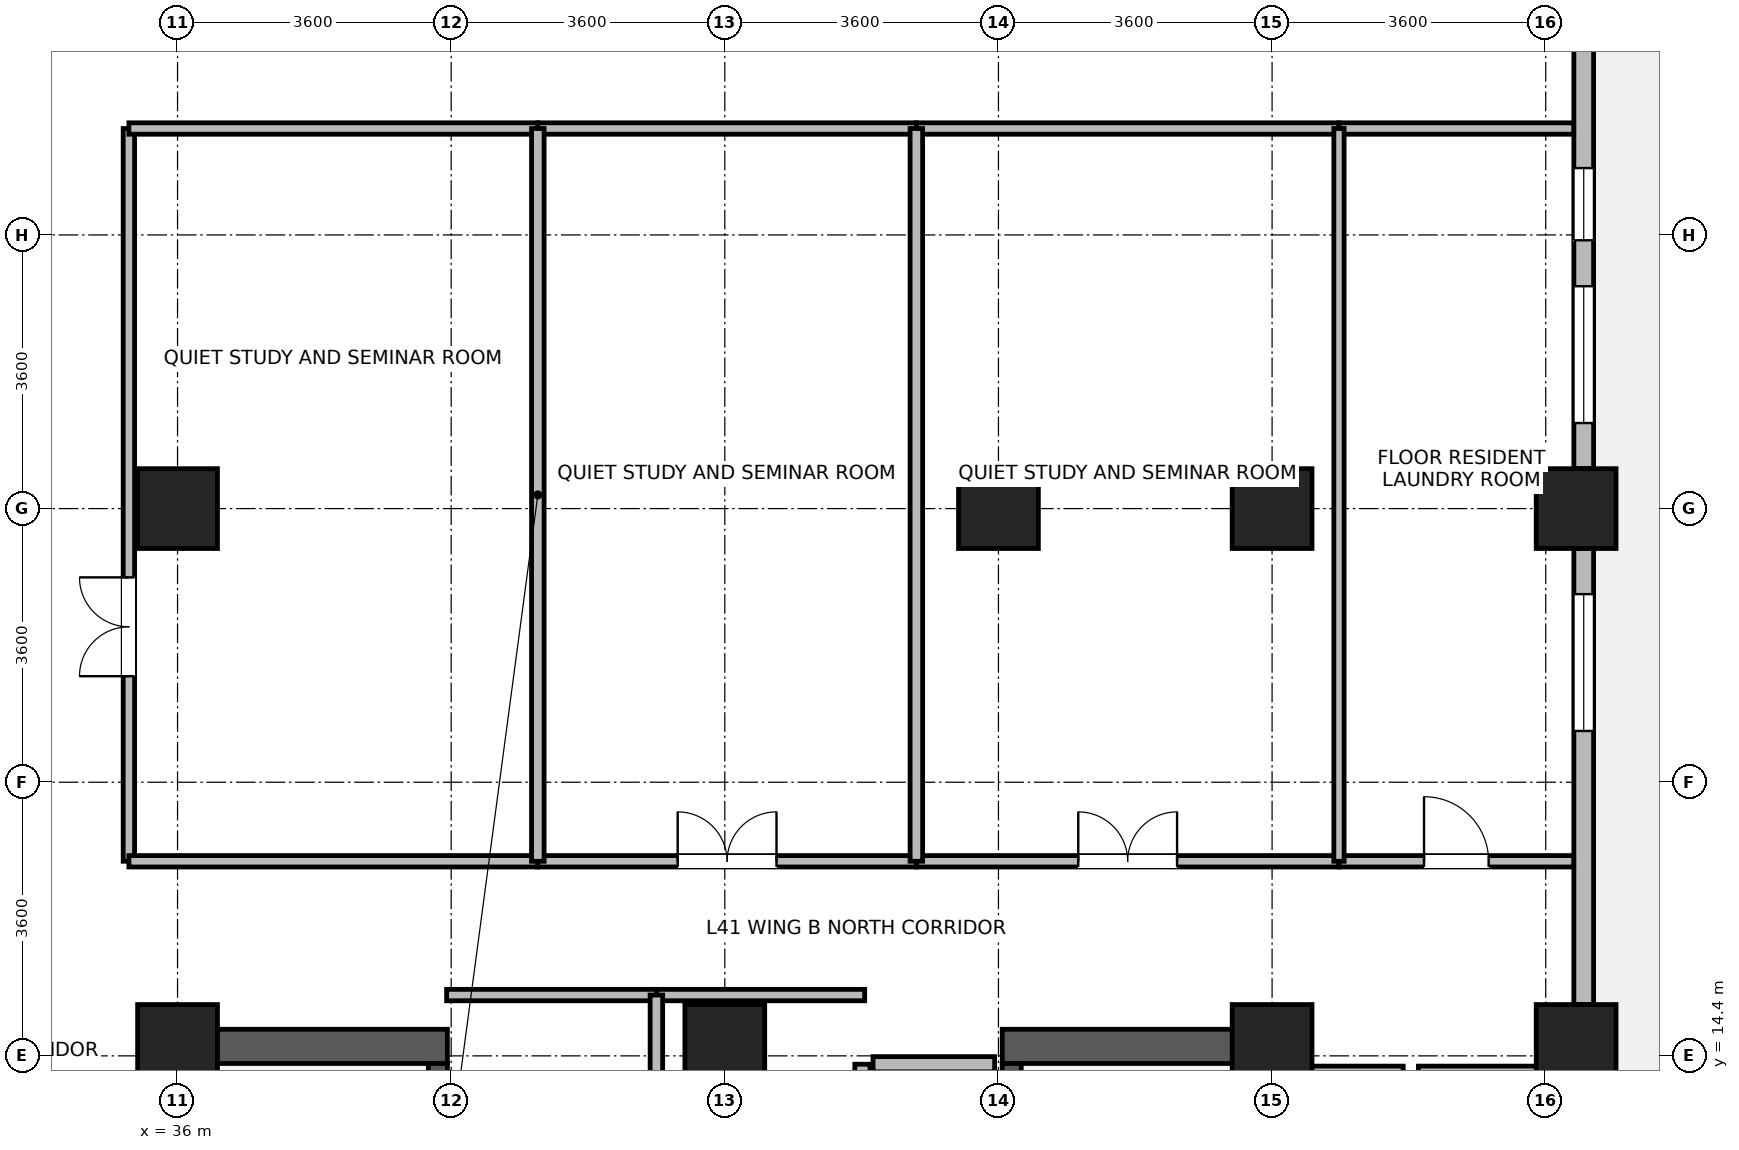
"""IFC4 building model, lengths in metres.
Left out: names, types, materials, properties, quantities, classifications, styles, units other than length and angle.
Written with IfcOpenShell. Run it as: python <this file> out.ifc"""

import sys

from ifc_helpers import new_model, si_unit, direction, frame, frame_2d, origin, origin_2d, place, context, subcontext, project, spatial, rectangle, extrude, source, transform, mapped, element, fill, save


model = new_model("IFC4")
c1 = context("Model", 3, precision=1e-05, world=origin(), true_north=direction((0.0, 1.0)))
c2 = subcontext(c1, "Body", "Model", "MODEL_VIEW")
j1 = project(units=[si_unit("LENGTHUNIT", "METRE"), si_unit("PLANEANGLEUNIT", "RADIAN")], contexts=[c1])
p1 = place(None, origin())
s1 = spatial("IfcSite", under=j1, at=p1, CompositionType="ELEMENT")
p2 = place(p1, origin())
s2 = spatial("IfcBuilding", under=s1, at=p2, CompositionType="ELEMENT")
p3 = place(p2, frame((0.0, 0.0, 162.4)))
s3 = spatial("IfcBuildingStorey", under=s2, at=p3, CompositionType="ELEMENT", Elevation=162.4)
for number, where, z_axis, x_axis in (
    (1, (36.125, 6.85, 0.0), (0.0, 0.0, 1.0), (0.0, 1.0, 0.0)),
    (2, (50.275, 6.85, 0.0), (0.0, 0.0, 1.0), (0.0, 1.0, 0.0)),
):
    element("IfcWall", number, at=place(p3, frame(where, z_axis=z_axis, x_axis=x_axis)), inside=s3, PredefinedType="SHEAR", context=c2, shape_type="SweptSolid", body=[
        extrude(rectangle(XDim=7.9, YDim=0.45, at=frame_2d((3.95, 0.0))), origin(), (0.0, 0.0, 1.0), 3.46),
    ])
for number, where, z_axis, x_axis in (
    (3, (36.35, 14.525, 0.0), (0.0, 0.0, 1.0), (1.0, 0.0, 0.0)),
    (4, (46.85, 14.525, 0.0), (0.0, 0.0, 1.0), (1.0, 0.0, 0.0)),
):
    element("IfcWall", number, at=place(p3, frame(where, z_axis=z_axis, x_axis=x_axis)), inside=s3, PredefinedType="SHEAR", context=c2, shape_type="SweptSolid", body=[
        extrude(rectangle(XDim=3.2, YDim=0.45, at=frame_2d((1.6, 0.0))), origin(), (0.0, 0.0, 1.0), 3.46),
    ])
p4 = place(p3, frame((39.425, 7.3, 0.0), z_axis=(0.0, 0.0, 1.0), x_axis=(0.0, 1.0, 0.0)))
e5 = element("IfcWall", 5, at=p4, inside=s3, PredefinedType="SHEAR", context=c2, shape_type="SweptSolid", body=[
    extrude(rectangle(XDim=7.0, YDim=0.25, at=frame_2d((3.5, 0.0))), origin(), (0.0, 0.0, 1.0), 3.46),
])
p5 = place(p4, frame((0.15, 0.0, 0.0)))
e6 = element("IfcOpeningElement", 6, at=p5, cuts=e5, PredefinedType="OPENING", context=c2, shape_type="SweptSolid", body=[
    extrude(rectangle(XDim=1.1, YDim=2.08, at=frame_2d((0.55, 1.04))), frame((0.0, 0.135, 0.0), z_axis=(0.0, -1.0, 0.0), x_axis=(1.0, 0.0, 0.0)), (0.0, 0.0, 1.0), 0.27),
])
p6 = place(p3, frame((46.975, 7.3, 0.0), z_axis=(0.0, 0.0, 1.0), x_axis=(0.0, 1.0, 0.0)))
e7 = element("IfcWall", 7, at=p6, inside=s3, PredefinedType="SHEAR", context=c2, shape_type="SweptSolid", body=[
    extrude(rectangle(XDim=7.0, YDim=0.25, at=frame_2d((3.5, 0.0))), origin(), (0.0, 0.0, 1.0), 3.46),
])
p7 = place(p6, frame((0.15, 0.0, 0.0)))
e8 = element("IfcOpeningElement", 8, at=p7, cuts=e7, PredefinedType="OPENING", context=c2, shape_type="SweptSolid", body=[
    extrude(rectangle(XDim=1.1, YDim=2.08, at=frame_2d((0.55, 1.04))), frame((0.0, 0.135, 0.0), z_axis=(0.0, -1.0, 0.0), x_axis=(1.0, 0.0, 0.0)), (0.0, 0.0, 1.0), 0.27),
])
m1 = source(origin(), c2, "Body", "SweptSolid", [
    extrude(rectangle(XDim=1.05, YDim=1.05, at=origin_2d()), origin(), (0.0, 0.0, 1.0), 3.7),
])
for number, where, z_axis, x_axis in (
    (9, (36.0, 21.6, 0.0), (0.0, 0.0, 1.0), (1.0, 0.0, 0.0)),
    (10, (46.8, 21.6, 0.0), (0.0, 0.0, 1.0), (1.0, 0.0, 0.0)),
    (11, (36.0, 14.55, 0.0), (0.0, 0.0, 1.0), (1.0, 0.0, 0.0)),
    (12, (43.2, 14.55, 0.0), (0.0, 0.0, 1.0), (1.0, 0.0, 0.0)),
    (13, (50.4, 14.55, 0.0), (0.0, 0.0, 1.0), (1.0, 0.0, 0.0)),
    (14, (50.4, 21.6, 0.0), (0.0, 0.0, 1.0), (1.0, 0.0, 0.0)),
    (15, (54.4, 14.55, 0.0), (0.0, 0.0, 1.0), (1.0, 0.0, 0.0)),
    (16, (54.4, 21.6, 0.0), (0.0, 0.0, 1.0), (1.0, 0.0, 0.0)),
):
    element("IfcColumn", number, at=place(p3, frame(where, z_axis=z_axis, x_axis=x_axis)), inside=s3, PredefinedType="COLUMN", context=c2, shape_type="MappedRepresentation", body=[
        mapped(m1, transform((0.0, 0.0, 0.0), x_axis=(1.0, 0.0, 0.0), y_axis=(0.0, 1.0, 0.0), z_axis=(0.0, 0.0, 1.0), scale=1.0)),
    ])
p8 = place(p3, frame((54.5, 21.074, 0.0), z_axis=(0.0, 0.0, 1.0), x_axis=(0.0, -1.0, 0.0)))
e17 = element("IfcWall", 17, at=p8, inside=s3, PredefinedType="STANDARD", context=c2, shape_type="SweptSolid", body=[
    extrude(rectangle(XDim=5.998, YDim=0.26, at=frame_2d((2.999, 0.0))), origin(), (0.0, 0.0, 1.0), 2.99),
])
p9 = place(p8, frame((0.6, 0.0, 0.85)))
e18 = element("IfcOpeningElement", 18, at=p9, cuts=e17, PredefinedType="OPENING", context=c2, shape_type="SweptSolid", body=[
    extrude(rectangle(XDim=1.8, YDim=1.85, at=frame_2d((0.9, 0.925))), frame((0.0, 0.14, 0.0), z_axis=(0.0, -1.0, 0.0), x_axis=(1.0, 0.0, 0.0)), (0.0, 0.0, 1.0), 0.28),
])
p10 = place(p3, frame((54.5, 28.124, 0.0), z_axis=(0.0, 0.0, 1.0), x_axis=(0.0, -1.0, 0.0)))
e19 = element("IfcWall", 19, at=p10, inside=s3, PredefinedType="STANDARD", context=c2, shape_type="SweptSolid", body=[
    extrude(rectangle(XDim=5.998, YDim=0.26, at=frame_2d((2.999, 0.0))), origin(), (0.0, 0.0, 1.0), 2.99),
])
p11 = place(p10, frame((3.598, 0.0, 0.85)))
e20 = element("IfcOpeningElement", 20, at=p11, cuts=e19, PredefinedType="OPENING", context=c2, shape_type="SweptSolid", body=[
    extrude(rectangle(XDim=1.8, YDim=1.85, at=frame_2d((0.9, 0.925))), frame((0.0, 0.14, 0.0), z_axis=(0.0, -1.0, 0.0), x_axis=(1.0, 0.0, 0.0)), (0.0, 0.0, 1.0), 0.28),
])
p12 = place(p10, frame((2.044, 0.0, 0.85)))
e21 = element("IfcOpeningElement", 21, at=p12, cuts=e19, PredefinedType="OPENING", context=c2, shape_type="SweptSolid", body=[
    extrude(rectangle(XDim=0.95, YDim=1.75, at=frame_2d((0.475, 0.875))), frame((0.0, 0.14, 0.0), z_axis=(0.0, -1.0, 0.0), x_axis=(1.0, 0.0, 0.0)), (0.0, 0.0, 1.0), 0.28),
])
p13 = place(p3, frame((50.475, 14.165, 0.0), z_axis=(0.0, 0.0, 1.0), x_axis=(1.0, 0.0, 0.0)))
e22 = element("IfcWall", 22, at=p13, inside=s3, PredefinedType="PARTITIONING", context=c2, shape_type="SweptSolid", body=[
    extrude(rectangle(XDim=1.65, YDim=0.2, at=frame_2d((0.825, 0.0))), origin(), (0.0, 0.0, 1.0), 3.44),
])
p14 = place(p3, frame((52.325, 14.165, 0.0), z_axis=(0.0, 0.0, 1.0), x_axis=(1.0, 0.0, 0.0)))
e23 = element("IfcWall", 23, at=p14, inside=s3, PredefinedType="PARTITIONING", context=c2, shape_type="SweptSolid", body=[
    extrude(rectangle(XDim=1.65, YDim=0.2, at=frame_2d((0.825, 0.0))), origin(), (0.0, 0.0, 1.0), 3.44),
])
p15 = place(p3, frame((45.15, 14.29, 0.0), z_axis=(0.0, 0.0, 1.0), x_axis=(1.0, 0.0, 0.0)))
e24 = element("IfcWall", 24, at=p15, inside=s3, PredefinedType="PARTITIONING", context=c2, shape_type="SweptSolid", body=[
    extrude(rectangle(XDim=1.6, YDim=0.2, at=frame_2d((0.8, 0.0))), origin(), (0.0, 0.0, 1.0), 2.44),
])
p16 = place(p3, frame((45.01, 11.61, 0.0), z_axis=(0.0, 0.0, 1.0), x_axis=(0.0, 1.0, 0.0)))
e25 = element("IfcWall", 25, at=p16, inside=s3, PredefinedType="PARTITIONING", context=c2, shape_type="SweptSolid", body=[
    extrude(rectangle(XDim=2.68, YDim=0.2, at=frame_2d((1.34, 0.0))), origin(), (0.0, 0.0, 1.0), 3.44),
])
p17 = place(p3, frame((35.36, 16.96, 0.0), z_axis=(0.0, 0.0, 1.0), x_axis=(0.0, 1.0, 0.0)))
e26 = element("IfcWall", 26, at=p17, inside=s3, PredefinedType="PARTITIONING", context=c2, shape_type="SweptSolid", body=[
    extrude(rectangle(XDim=9.64, YDim=0.15, at=frame_2d((4.82, 0.0))), origin(), (0.0, 0.0, 1.0), 3.44),
])
p18 = place(p17, frame((2.435, 0.0, 0.0)))
e27 = element("IfcOpeningElement", 27, at=p18, cuts=e26, PredefinedType="OPENING", context=c2, shape_type="SweptSolid", body=[
    extrude(rectangle(XDim=1.3, YDim=2.12, at=frame_2d((0.65, 1.06))), frame((0.0, 0.085, 0.0), z_axis=(0.0, -1.0, 0.0), x_axis=(1.0, 0.0, 0.0)), (0.0, 0.0, 1.0), 0.17),
])
p19 = place(p3, frame((45.72, 16.96, 0.0), z_axis=(0.0, 0.0, 1.0), x_axis=(1.0, 0.0, 0.0)))
e28 = element("IfcWall", 28, at=p19, inside=s3, PredefinedType="PARTITIONING", context=c2, shape_type="SweptSolid", body=[
    extrude(rectangle(XDim=5.56, YDim=0.15, at=frame_2d((2.78, 0.0))), origin(), (0.0, 0.0, 1.0), 3.44),
])
p20 = place(p19, frame((2.13, 0.0, 0.0)))
e29 = element("IfcOpeningElement", 29, at=p20, cuts=e28, PredefinedType="OPENING", context=c2, shape_type="SweptSolid", body=[
    extrude(rectangle(XDim=1.3, YDim=2.12, at=frame_2d((0.65, 1.06))), frame((0.0, 0.085, 0.0), z_axis=(0.0, -1.0, 0.0), x_axis=(1.0, 0.0, 0.0)), (0.0, 0.0, 1.0), 0.17),
])
p21 = place(p3, frame((45.72, 26.6, 0.0), z_axis=(0.0, 0.0, 1.0), x_axis=(1.0, 0.0, 0.0)))
e30 = element("IfcWall", 30, at=p21, inside=s3, PredefinedType="PARTITIONING", context=c2, shape_type="SweptSolid", body=[
    extrude(rectangle(XDim=5.56, YDim=0.15, at=frame_2d((2.78, 0.0))), origin(), (0.0, 0.0, 1.0), 3.44),
])
for number, where, z_axis, x_axis in (
    (31, (35.36, 16.96, 0.0), (0.0, 0.0, 1.0), (1.0, 0.0, 0.0)),
    (32, (35.36, 26.6, 0.0), (0.0, 0.0, 1.0), (1.0, 0.0, 0.0)),
):
    element("IfcWall", number, at=place(p3, frame(where, z_axis=z_axis, x_axis=x_axis)), inside=s3, PredefinedType="PARTITIONING", context=c2, shape_type="SweptSolid", body=[
        extrude(rectangle(XDim=5.38, YDim=0.15, at=frame_2d((2.69, 0.0))), origin(), (0.0, 0.0, 1.0), 3.44),
    ])
p22 = place(p3, frame((40.74, 16.96, 0.0), z_axis=(0.0, 0.0, 1.0), x_axis=(1.0, 0.0, 0.0)))
e33 = element("IfcWall", 33, at=p22, inside=s3, PredefinedType="PARTITIONING", context=c2, shape_type="SweptSolid", body=[
    extrude(rectangle(XDim=4.98, YDim=0.15, at=frame_2d((2.49, 0.0))), origin(), (0.0, 0.0, 1.0), 3.44),
])
p23 = place(p22, frame((1.84, 0.0, 0.0)))
e34 = element("IfcOpeningElement", 34, at=p23, cuts=e33, PredefinedType="OPENING", context=c2, shape_type="SweptSolid", body=[
    extrude(rectangle(XDim=1.3, YDim=2.12, at=frame_2d((0.65, 1.06))), frame((0.0, 0.085, 0.0), z_axis=(0.0, -1.0, 0.0), x_axis=(1.0, 0.0, 0.0)), (0.0, 0.0, 1.0), 0.17),
])
p24 = place(p3, frame((40.74, 26.6, 0.0), z_axis=(0.0, 0.0, 1.0), x_axis=(1.0, 0.0, 0.0)))
e35 = element("IfcWall", 35, at=p24, inside=s3, PredefinedType="PARTITIONING", context=c2, shape_type="SweptSolid", body=[
    extrude(rectangle(XDim=4.98, YDim=0.15, at=frame_2d((2.49, 0.0))), origin(), (0.0, 0.0, 1.0), 3.44),
])
p25 = place(p3, frame((51.28, 16.96, 0.0), z_axis=(0.0, 0.0, 1.0), x_axis=(1.0, 0.0, 0.0)))
e36 = element("IfcWall", 36, at=p25, inside=s3, PredefinedType="PARTITIONING", context=c2, shape_type="SweptSolid", body=[
    extrude(rectangle(XDim=3.088, YDim=0.15, at=frame_2d((1.544, 0.0))), origin(), (0.0, 0.0, 1.0), 3.44),
])
p26 = place(p25, frame((1.119, 0.0, 0.0)))
e37 = element("IfcOpeningElement", 37, at=p26, cuts=e36, PredefinedType="OPENING", context=c2, shape_type="SweptSolid", body=[
    extrude(rectangle(XDim=0.85, YDim=2.04, at=frame_2d((0.425, 1.02))), frame((0.0, 0.085, 0.0), z_axis=(0.0, -1.0, 0.0), x_axis=(1.0, 0.0, 0.0)), (0.0, 0.0, 1.0), 0.17),
])
p27 = place(p3, frame((51.28, 26.6, 0.0), z_axis=(0.0, 0.0, 1.0), x_axis=(1.0, 0.0, 0.0)))
e38 = element("IfcWall", 38, at=p27, inside=s3, PredefinedType="PARTITIONING", context=c2, shape_type="SweptSolid", body=[
    extrude(rectangle(XDim=3.088, YDim=0.15, at=frame_2d((1.544, 0.0))), origin(), (0.0, 0.0, 1.0), 3.44),
])
p28 = place(p3, frame((39.54, 15.2, 0.0), z_axis=(0.0, 0.0, 1.0), x_axis=(1.0, 0.0, 0.0)))
e39 = element("IfcWall", 39, at=p28, inside=s3, PredefinedType="PARTITIONING", context=c2, shape_type="SweptSolid", body=[
    extrude(rectangle(XDim=2.76, YDim=0.15, at=frame_2d((1.38, 0.0))), origin(), (0.0, 0.0, 1.0), 3.44),
])
p29 = place(p3, frame((42.3, 15.2, 0.0), z_axis=(0.0, 0.0, 1.0), x_axis=(1.0, 0.0, 0.0)))
e40 = element("IfcWall", 40, at=p29, inside=s3, PredefinedType="PARTITIONING", context=c2, shape_type="SweptSolid", body=[
    extrude(rectangle(XDim=2.74, YDim=0.15, at=frame_2d((1.37, 0.0))), origin(), (0.0, 0.0, 1.0), 3.44),
])
for number, where, z_axis, x_axis in (
    (41, (40.74, 16.96, 0.0), (0.0, 0.0, 1.0), (0.0, 1.0, 0.0)),
    (42, (45.72, 16.96, 0.0), (0.0, 0.0, 1.0), (0.0, 1.0, 0.0)),
):
    element("IfcWall", number, at=place(p3, frame(where, z_axis=z_axis, x_axis=x_axis)), inside=s3, PredefinedType="PARTITIONING", context=c2, shape_type="SweptSolid", body=[
        extrude(rectangle(XDim=9.64, YDim=0.165, at=frame_2d((4.82, 0.0))), origin(), (0.0, 0.0, 1.0), 3.44),
    ])
p30 = place(p3, frame((51.28, 16.96, 0.0), z_axis=(0.0, 0.0, 1.0), x_axis=(0.0, 1.0, 0.0)))
e43 = element("IfcWall", 43, at=p30, inside=s3, PredefinedType="PARTITIONING", context=c2, shape_type="SweptSolid", body=[
    extrude(rectangle(XDim=9.64, YDim=0.135, at=frame_2d((4.82, 0.0))), origin(), (0.0, 0.0, 1.0), 3.44),
])
p31 = place(p3, frame((42.3, 11.64, 0.0), z_axis=(0.0, 0.0, 1.0), x_axis=(0.0, 1.0, 0.0)))
e44 = element("IfcWall", 44, at=p31, inside=s3, PredefinedType="PARTITIONING", context=c2, shape_type="SweptSolid", body=[
    extrude(rectangle(XDim=3.56, YDim=0.165, at=frame_2d((1.78, 0.0))), origin(), (0.0, 0.0, 1.0), 3.44),
])
p32 = place(p9, origin())
e45 = element("IfcWindow", 45, at=p32, inside=s3, PartitioningType="SINGLE_PANEL", PredefinedType="WINDOW", context=c2, shape_type="SweptSolid", body=[
    extrude(rectangle(XDim=1.8, YDim=1.85, at=frame_2d((0.9, 0.925))), frame((0.0, 0.03, 0.0), z_axis=(0.0, -1.0, 0.0), x_axis=(1.0, 0.0, 0.0)), (0.0, 0.0, 1.0), 0.06),
])
fill(e18, e45)
p33 = place(p11, origin())
e46 = element("IfcWindow", 46, at=p33, inside=s3, PartitioningType="SINGLE_PANEL", PredefinedType="WINDOW", context=c2, shape_type="SweptSolid", body=[
    extrude(rectangle(XDim=1.8, YDim=1.85, at=frame_2d((0.9, 0.925))), frame((0.0, 0.03, 0.0), z_axis=(0.0, -1.0, 0.0), x_axis=(1.0, 0.0, 0.0)), (0.0, 0.0, 1.0), 0.06),
])
fill(e20, e46)
p34 = place(p12, origin())
e47 = element("IfcWindow", 47, at=p34, inside=s3, PartitioningType="SINGLE_PANEL", PredefinedType="WINDOW", context=c2, shape_type="SweptSolid", body=[
    extrude(rectangle(XDim=0.95, YDim=1.75, at=frame_2d((0.475, 0.875))), frame((0.0, 0.03, 0.0), z_axis=(0.0, -1.0, 0.0), x_axis=(1.0, 0.0, 0.0)), (0.0, 0.0, 1.0), 0.06),
])
fill(e21, e47)
p35 = place(p18, origin())
e48 = element("IfcDoor", 48, at=p35, inside=s3, OperationType="DOUBLE_DOOR_SINGLE_SWING", PredefinedType="DOOR", context=c2, shape_type="SweptSolid", body=[
    extrude(rectangle(XDim=1.3, YDim=2.12, at=frame_2d((0.65, 1.06))), frame((0.0, 0.025, 0.0), z_axis=(0.0, -1.0, 0.0), x_axis=(1.0, 0.0, 0.0)), (0.0, 0.0, 1.0), 0.05),
])
fill(e27, e48)
p36 = place(p20, origin())
e49 = element("IfcDoor", 49, at=p36, inside=s3, OperationType="DOUBLE_DOOR_SINGLE_SWING", PredefinedType="DOOR", context=c2, shape_type="SweptSolid", body=[
    extrude(rectangle(XDim=1.3, YDim=2.12, at=frame_2d((0.65, 1.06))), frame((0.0, 0.025, 0.0), z_axis=(0.0, -1.0, 0.0), x_axis=(1.0, 0.0, 0.0)), (0.0, 0.0, 1.0), 0.05),
])
fill(e29, e49)
p37 = place(p23, origin())
e50 = element("IfcDoor", 50, at=p37, inside=s3, OperationType="DOUBLE_DOOR_SINGLE_SWING", PredefinedType="DOOR", context=c2, shape_type="SweptSolid", body=[
    extrude(rectangle(XDim=1.3, YDim=2.12, at=frame_2d((0.65, 1.06))), frame((0.0, 0.025, 0.0), z_axis=(0.0, -1.0, 0.0), x_axis=(1.0, 0.0, 0.0)), (0.0, 0.0, 1.0), 0.05),
])
fill(e34, e50)
p38 = place(p26, origin())
e51 = element("IfcDoor", 51, at=p38, inside=s3, OperationType="SINGLE_SWING_LEFT", PredefinedType="DOOR", context=c2, shape_type="SweptSolid", body=[
    extrude(rectangle(XDim=0.85, YDim=2.04, at=frame_2d((0.425, 1.02))), frame((0.0, 0.025, 0.0), z_axis=(0.0, -1.0, 0.0), x_axis=(1.0, 0.0, 0.0)), (0.0, 0.0, 1.0), 0.05),
])
fill(e37, e51)
save(model, sys.argv[1])
